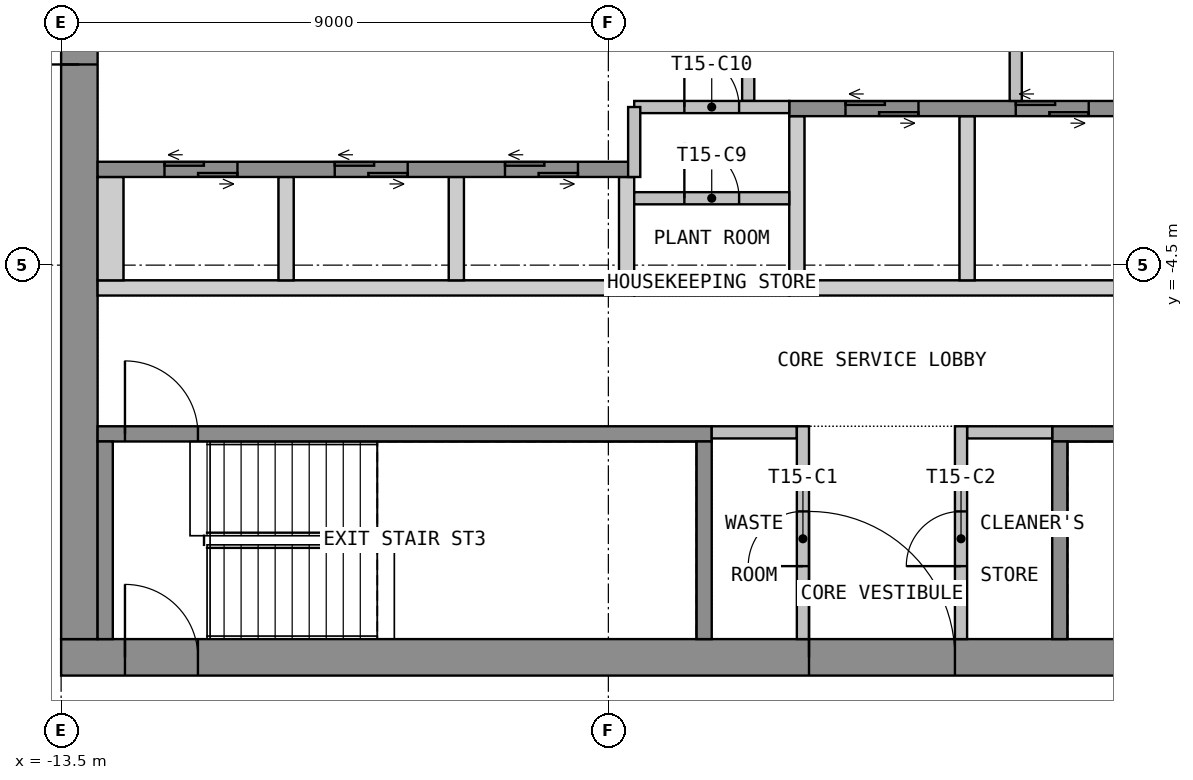
"""IFC4 building model, lengths in metres.
Left out: names, types, materials, properties, quantities, classifications, styles, units other than length and angle.
Written with IfcOpenShell. Run it as: python <this file> out.ifc"""

import sys

from ifc_helpers import new_model, si_unit, direction, frame, frame_2d, origin, place, context, subcontext, project, spatial, polyline, rectangle, outline, extrude, element, fill, save


model = new_model("IFC4")
c1 = context("Model", 3, precision=1e-05, world=origin(), true_north=direction((0.0, 1.0)))
c2 = subcontext(c1, "Body", "Model", "MODEL_VIEW")
j1 = project(units=[si_unit("LENGTHUNIT", "METRE"), si_unit("PLANEANGLEUNIT", "RADIAN")], contexts=[c1])
p1 = place(None, origin())
s1 = spatial("IfcSite", under=j1, at=p1, CompositionType="ELEMENT")
p2 = place(p1, origin())
s2 = spatial("IfcBuilding", under=s1, at=p2, CompositionType="ELEMENT")
p3 = place(p2, frame((0.0, 0.0, 207.3)))
s3 = spatial("IfcBuildingStorey", under=s2, at=p3, CompositionType="ELEMENT", Elevation=207.3)
p4 = place(p3, frame((-13.5, -10.95, 0.0), z_axis=(0.0, 0.0, 1.0), x_axis=(1.0, 0.0, 0.0)))
e1 = element("IfcWall", 1, at=p4, inside=s3, PredefinedType="SHEAR", context=c2, shape_type="SweptSolid", body=[
    extrude(rectangle(XDim=27.0, YDim=0.6, at=frame_2d((13.5, 0.0))), origin(), (0.0, 0.0, 1.0), 3.55),
])
p5 = place(p4, frame((12.3, 0.0, 0.0)))
e2 = element("IfcOpeningElement", 2, at=p5, cuts=e1, PredefinedType="OPENING", context=c2, shape_type="SweptSolid", body=[
    extrude(rectangle(XDim=2.4, YDim=2.1, at=frame_2d((1.2, 1.05))), frame((0.0, 0.31, 0.0), z_axis=(0.0, -1.0, 0.0), x_axis=(1.0, 0.0, 0.0)), (0.0, 0.0, 1.0), 0.62),
])
p6 = place(p4, frame((1.05, 0.0, 0.0)))
e3 = element("IfcOpeningElement", 3, at=p6, cuts=e1, PredefinedType="OPENING", context=c2, shape_type="SweptSolid", body=[
    extrude(rectangle(XDim=1.2, YDim=2.1, at=frame_2d((0.6, 1.05))), frame((0.0, 0.31, 0.0), z_axis=(0.0, -1.0, 0.0), x_axis=(1.0, 0.0, 0.0)), (0.0, 0.0, 1.0), 0.62),
])
p7 = place(p4, frame((24.75, 0.0, 0.0)))
e4 = element("IfcOpeningElement", 4, at=p7, cuts=e1, PredefinedType="OPENING", context=c2, shape_type="SweptSolid", body=[
    extrude(rectangle(XDim=1.2, YDim=2.1, at=frame_2d((0.6, 1.05))), frame((0.0, 0.31, 0.0), z_axis=(0.0, -1.0, 0.0), x_axis=(1.0, 0.0, 0.0)), (0.0, 0.0, 1.0), 0.62),
])
p8 = place(p3, frame((-13.2, -10.65, 0.0), z_axis=(0.0, 0.0, 1.0), x_axis=(0.0, 1.0, 0.0)))
e5 = element("IfcWall", 5, at=p8, inside=s3, PredefinedType="SHEAR", context=c2, shape_type="SweptSolid", body=[
    extrude(rectangle(XDim=21.3, YDim=0.6, at=frame_2d((10.65, 0.0))), origin(), (0.0, 0.0, 1.0), 3.55),
])
p9 = place(p8, frame((9.45, 0.0, 0.0)))
e6 = element("IfcOpeningElement", 6, at=p9, cuts=e5, PredefinedType="OPENING", context=c2, shape_type="SweptSolid", body=[
    extrude(rectangle(XDim=2.4, YDim=2.1, at=frame_2d((1.2, 1.05))), frame((0.0, 0.31, 0.0), z_axis=(0.0, -1.0, 0.0), x_axis=(1.0, 0.0, 0.0)), (0.0, 0.0, 1.0), 0.62),
])
p10 = place(p3, origin())
e7 = element("IfcWall", 7, at=p10, inside=s3, PredefinedType="SHEAR", context=c2, shape_type="SweptSolid", body=[
    extrude(outline(polyline([(-12.9, -5.0), (-4.075, -5.0), (-4.075, -4.75), (-12.9, -4.75), (-12.9, -5.0)])), origin(), (0.0, 0.0, 1.0), 3.55),
])
p11 = place(p3, origin())
e8 = element("IfcWall", 8, at=p11, inside=s3, PredefinedType="SHEAR", context=c2, shape_type="SweptSolid", body=[
    extrude(outline(polyline([(-1.525, -5.0), (12.9, -5.0), (12.9, -4.75), (-1.525, -4.75), (-1.525, -5.0)])), origin(), (0.0, 0.0, 1.0), 3.55),
])
p12 = place(p3, origin())
e9 = element("IfcWall", 9, at=p12, inside=s3, PredefinedType="SHEAR", context=c2, shape_type="SweptSolid", body=[
    extrude(outline(polyline([(-12.9, -4.75), (-12.475, -4.75), (-12.475, -3.05), (-12.9, -3.05), (-12.9, -4.75)])), origin(), (0.0, 0.0, 1.0), 3.55),
])
p13 = place(p3, origin())
e10 = element("IfcWall", 10, at=p13, inside=s3, PredefinedType="SHEAR", context=c2, shape_type="SweptSolid", body=[
    extrude(outline(polyline([(-9.925, -4.75), (-9.675, -4.75), (-9.675, -3.05), (-9.925, -3.05), (-9.925, -4.75)])), origin(), (0.0, 0.0, 1.0), 3.55),
])
p14 = place(p3, origin())
e11 = element("IfcWall", 11, at=p14, inside=s3, PredefinedType="SHEAR", context=c2, shape_type="SweptSolid", body=[
    extrude(outline(polyline([(-7.125, -4.75), (-6.875, -4.75), (-6.875, -3.05), (-7.125, -3.05), (-7.125, -4.75)])), origin(), (0.0, 0.0, 1.0), 3.55),
])
p15 = place(p3, origin())
e12 = element("IfcWall", 12, at=p15, inside=s3, PredefinedType="SHEAR", context=c2, shape_type="SweptSolid", body=[
    extrude(outline(polyline([(-4.325, -4.75), (-4.075, -4.75), (-4.075, -3.05), (-4.325, -3.05), (-4.325, -4.75)])), origin(), (0.0, 0.0, 1.0), 3.55),
])
p16 = place(p3, origin())
e13 = element("IfcWall", 13, at=p16, inside=s3, PredefinedType="SHEAR", context=c2, shape_type="SweptSolid", body=[
    extrude(outline(polyline([(-1.525, -4.75), (-1.275, -4.75), (-1.275, -2.05), (-1.525, -2.05), (-1.525, -4.75)])), origin(), (0.0, 0.0, 1.0), 3.55),
])
p17 = place(p3, origin())
e14 = element("IfcWall", 14, at=p17, inside=s3, PredefinedType="SHEAR", context=c2, shape_type="SweptSolid", body=[
    extrude(outline(polyline([(1.275, -4.75), (1.525, -4.75), (1.525, -2.05), (1.275, -2.05), (1.275, -4.75)])), origin(), (0.0, 0.0, 1.0), 3.55),
])
p18 = place(p3, frame((-12.9, -2.925, 0.0), z_axis=(0.0, 0.0, 1.0), x_axis=(1.0, 0.0, 0.0)))
e15 = element("IfcWall", 15, at=p18, inside=s3, PredefinedType="SHEAR", context=c2, shape_type="SweptSolid", body=[
    extrude(rectangle(XDim=8.825, YDim=0.25, at=frame_2d((4.413, 0.0))), origin(), (0.0, 0.0, 1.0), 3.55),
])
p19 = place(p18, frame((1.1, 0.0, 0.0)))
e16 = element("IfcOpeningElement", 16, at=p19, cuts=e15, PredefinedType="OPENING", context=c2, shape_type="SweptSolid", body=[
    extrude(rectangle(XDim=1.2, YDim=2.1, at=frame_2d((0.6, 1.05))), frame((0.0, 0.135, 0.0), z_axis=(0.0, -1.0, 0.0), x_axis=(1.0, 0.0, 0.0)), (0.0, 0.0, 1.0), 0.27),
])
p20 = place(p18, frame((3.9, 0.0, 0.0)))
e17 = element("IfcOpeningElement", 17, at=p20, cuts=e15, PredefinedType="OPENING", context=c2, shape_type="SweptSolid", body=[
    extrude(rectangle(XDim=1.2, YDim=2.1, at=frame_2d((0.6, 1.05))), frame((0.0, 0.135, 0.0), z_axis=(0.0, -1.0, 0.0), x_axis=(1.0, 0.0, 0.0)), (0.0, 0.0, 1.0), 0.27),
])
p21 = place(p18, frame((6.7, 0.0, 0.0)))
e18 = element("IfcOpeningElement", 18, at=p21, cuts=e15, PredefinedType="OPENING", context=c2, shape_type="SweptSolid", body=[
    extrude(rectangle(XDim=1.2, YDim=2.1, at=frame_2d((0.6, 1.05))), frame((0.0, 0.135, 0.0), z_axis=(0.0, -1.0, 0.0), x_axis=(1.0, 0.0, 0.0)), (0.0, 0.0, 1.0), 0.27),
])
p22 = place(p3, frame((-1.525, -1.925, 0.0), z_axis=(0.0, 0.0, 1.0), x_axis=(1.0, 0.0, 0.0)))
e19 = element("IfcWall", 19, at=p22, inside=s3, PredefinedType="SHEAR", context=c2, shape_type="SweptSolid", body=[
    extrude(rectangle(XDim=14.425, YDim=0.25, at=frame_2d((7.212, 0.0))), origin(), (0.0, 0.0, 1.0), 3.55),
])
p23 = place(p22, frame((0.925, 0.0, 0.0)))
e20 = element("IfcOpeningElement", 20, at=p23, cuts=e19, PredefinedType="OPENING", context=c2, shape_type="SweptSolid", body=[
    extrude(rectangle(XDim=1.2, YDim=2.1, at=frame_2d((0.6, 1.05))), frame((0.0, 0.135, 0.0), z_axis=(0.0, -1.0, 0.0), x_axis=(1.0, 0.0, 0.0)), (0.0, 0.0, 1.0), 0.27),
])
p24 = place(p22, frame((3.725, 0.0, 0.0)))
e21 = element("IfcOpeningElement", 21, at=p24, cuts=e19, PredefinedType="OPENING", context=c2, shape_type="SweptSolid", body=[
    extrude(rectangle(XDim=1.2, YDim=2.1, at=frame_2d((0.6, 1.05))), frame((0.0, 0.135, 0.0), z_axis=(0.0, -1.0, 0.0), x_axis=(1.0, 0.0, 0.0)), (0.0, 0.0, 1.0), 0.27),
])
p25 = place(p3, frame((-2.2, -1.8, 0.0), z_axis=(0.0, 0.0, 1.0), x_axis=(0.0, 1.0, 0.0)))
e22 = element("IfcWall", 22, at=p25, inside=s3, PredefinedType="PARTITIONING", context=c2, shape_type="SweptSolid", body=[
    extrude(rectangle(XDim=3.6, YDim=0.2, at=frame_2d((1.8, 0.0))), origin(), (0.0, 0.0, 1.0), 3.55),
])
p26 = place(p25, frame((1.2, 0.0, 0.0)))
e23 = element("IfcOpeningElement", 23, at=p26, cuts=e22, PredefinedType="OPENING", context=c2, shape_type="SweptSolid", body=[
    extrude(rectangle(XDim=1.2, YDim=2.1, at=frame_2d((0.6, 1.05))), frame((0.0, 0.11, 0.0), z_axis=(0.0, -1.0, 0.0), x_axis=(1.0, 0.0, 0.0)), (0.0, 0.0, 1.0), 0.22),
])
p27 = place(p3, frame((2.2, -1.8, 0.0), z_axis=(0.0, 0.0, 1.0), x_axis=(0.0, 1.0, 0.0)))
e24 = element("IfcWall", 24, at=p27, inside=s3, PredefinedType="PARTITIONING", context=c2, shape_type="SweptSolid", body=[
    extrude(rectangle(XDim=3.6, YDim=0.2, at=frame_2d((1.8, 0.0))), origin(), (0.0, 0.0, 1.0), 3.55),
])
p28 = place(p27, frame((1.2, 0.0, 0.0)))
e25 = element("IfcOpeningElement", 25, at=p28, cuts=e24, PredefinedType="OPENING", context=c2, shape_type="SweptSolid", body=[
    extrude(rectangle(XDim=1.2, YDim=2.1, at=frame_2d((0.6, 1.05))), frame((0.0, 0.11, 0.0), z_axis=(0.0, -1.0, 0.0), x_axis=(1.0, 0.0, 0.0)), (0.0, 0.0, 1.0), 0.22),
])
p29 = place(p3, frame((-12.9, -7.275, 0.0), z_axis=(0.0, 0.0, 1.0), x_axis=(1.0, 0.0, 0.0)))
e26 = element("IfcWall", 26, at=p29, inside=s3, PredefinedType="SHEAR", context=c2, shape_type="SweptSolid", body=[
    extrude(rectangle(XDim=10.1, YDim=0.25, at=frame_2d((5.05, 0.0))), origin(), (0.0, 0.0, 1.0), 3.55),
])
p30 = place(p29, frame((0.45, 0.0, 0.0)))
e27 = element("IfcOpeningElement", 27, at=p30, cuts=e26, PredefinedType="OPENING", context=c2, shape_type="SweptSolid", body=[
    extrude(rectangle(XDim=1.2, YDim=2.1, at=frame_2d((0.6, 1.05))), frame((0.0, 0.135, 0.0), z_axis=(0.0, -1.0, 0.0), x_axis=(1.0, 0.0, 0.0)), (0.0, 0.0, 1.0), 0.27),
])
for number, where, z_axis, x_axis in (
    (28, (-12.775, -10.65, 0.0), (0.0, 0.0, 1.0), (0.0, 1.0, 0.0)),
    (29, (-2.925, -10.65, 0.0), (0.0, 0.0, 1.0), (0.0, 1.0, 0.0)),
):
    element("IfcWall", number, at=place(p3, frame(where, z_axis=z_axis, x_axis=x_axis)), inside=s3, PredefinedType="SHEAR", context=c2, shape_type="SweptSolid", body=[
        extrude(rectangle(XDim=3.25, YDim=0.25, at=frame_2d((1.625, 0.0))), origin(), (0.0, 0.0, 1.0), 3.55),
    ])
p31 = place(p3, frame((2.8, -7.275, 0.0), z_axis=(0.0, 0.0, 1.0), x_axis=(1.0, 0.0, 0.0)))
e30 = element("IfcWall", 30, at=p31, inside=s3, PredefinedType="SHEAR", context=c2, shape_type="SweptSolid", body=[
    extrude(rectangle(XDim=10.1, YDim=0.25, at=frame_2d((5.05, 0.0))), origin(), (0.0, 0.0, 1.0), 3.55),
])
p32 = place(p31, frame((8.45, 0.0, 0.0)))
e31 = element("IfcOpeningElement", 31, at=p32, cuts=e30, PredefinedType="OPENING", context=c2, shape_type="SweptSolid", body=[
    extrude(rectangle(XDim=1.2, YDim=2.1, at=frame_2d((0.6, 1.05))), frame((0.0, 0.135, 0.0), z_axis=(0.0, -1.0, 0.0), x_axis=(1.0, 0.0, 0.0)), (0.0, 0.0, 1.0), 0.27),
])
p33 = place(p3, frame((2.925, -10.65, 0.0), z_axis=(0.0, 0.0, 1.0), x_axis=(0.0, 1.0, 0.0)))
e32 = element("IfcWall", 32, at=p33, inside=s3, PredefinedType="SHEAR", context=c2, shape_type="SweptSolid", body=[
    extrude(rectangle(XDim=3.25, YDim=0.25, at=frame_2d((1.625, 0.0))), origin(), (0.0, 0.0, 1.0), 3.55),
])
for number, where, z_axis, x_axis in (
    (33, (-2.8, -7.25, 0.0), (0.0, 0.0, 1.0), (1.0, 0.0, 0.0)),
    (34, (1.4, -7.25, 0.0), (0.0, 0.0, 1.0), (1.0, 0.0, 0.0)),
):
    element("IfcWall", number, at=place(p3, frame(where, z_axis=z_axis, x_axis=x_axis)), inside=s3, PredefinedType="PARTITIONING", context=c2, shape_type="SweptSolid", body=[
        extrude(rectangle(XDim=1.4, YDim=0.2, at=frame_2d((0.7, 0.0))), origin(), (0.0, 0.0, 1.0), 3.55),
    ])
p34 = place(p3, frame((-1.3, -10.65, 0.0), z_axis=(0.0, 0.0, 1.0), x_axis=(0.0, 1.0, 0.0)))
e35 = element("IfcWall", 35, at=p34, inside=s3, PredefinedType="PARTITIONING", context=c2, shape_type="SweptSolid", body=[
    extrude(rectangle(XDim=3.5, YDim=0.2, at=frame_2d((1.75, 0.0))), origin(), (0.0, 0.0, 1.0), 3.55),
])
p35 = place(p34, frame((1.2, 0.0, 0.0)))
e36 = element("IfcOpeningElement", 36, at=p35, cuts=e35, PredefinedType="OPENING", context=c2, shape_type="SweptSolid", body=[
    extrude(rectangle(XDim=0.9, YDim=2.1, at=frame_2d((0.45, 1.05))), frame((0.0, 0.11, 0.0), z_axis=(0.0, -1.0, 0.0), x_axis=(1.0, 0.0, 0.0)), (0.0, 0.0, 1.0), 0.22),
])
p36 = place(p3, frame((1.3, -10.65, 0.0), z_axis=(0.0, 0.0, 1.0), x_axis=(0.0, 1.0, 0.0)))
e37 = element("IfcWall", 37, at=p36, inside=s3, PredefinedType="PARTITIONING", context=c2, shape_type="SweptSolid", body=[
    extrude(rectangle(XDim=3.5, YDim=0.2, at=frame_2d((1.75, 0.0))), origin(), (0.0, 0.0, 1.0), 3.55),
])
p37 = place(p36, frame((1.2, 0.0, 0.0)))
e38 = element("IfcOpeningElement", 38, at=p37, cuts=e37, PredefinedType="OPENING", context=c2, shape_type="SweptSolid", body=[
    extrude(rectangle(XDim=0.9, YDim=2.1, at=frame_2d((0.45, 1.05))), frame((0.0, 0.11, 0.0), z_axis=(0.0, -1.0, 0.0), x_axis=(1.0, 0.0, 0.0)), (0.0, 0.0, 1.0), 0.22),
])
p38 = place(p3, frame((-4.075, -3.4, 0.0), z_axis=(0.0, 0.0, 1.0), x_axis=(1.0, 0.0, 0.0)))
e39 = element("IfcWall", 39, at=p38, inside=s3, PredefinedType="PARTITIONING", context=c2, shape_type="SweptSolid", body=[
    extrude(rectangle(XDim=2.55, YDim=0.2, at=frame_2d((1.275, 0.0))), origin(), (0.0, 0.0, 1.0), 3.55),
])
p39 = place(p38, frame((0.825, 0.0, 0.0)))
e40 = element("IfcOpeningElement", 40, at=p39, cuts=e39, PredefinedType="OPENING", context=c2, shape_type="SweptSolid", body=[
    extrude(rectangle(XDim=0.9, YDim=2.1, at=frame_2d((0.45, 1.05))), frame((0.0, 0.11, 0.0), z_axis=(0.0, -1.0, 0.0), x_axis=(1.0, 0.0, 0.0)), (0.0, 0.0, 1.0), 0.22),
])
p40 = place(p3, frame((-4.075, -1.9, 0.0), z_axis=(0.0, 0.0, 1.0), x_axis=(1.0, 0.0, 0.0)))
e41 = element("IfcWall", 41, at=p40, inside=s3, PredefinedType="PARTITIONING", context=c2, shape_type="SweptSolid", body=[
    extrude(rectangle(XDim=2.55, YDim=0.2, at=frame_2d((1.275, 0.0))), origin(), (0.0, 0.0, 1.0), 3.55),
])
p41 = place(p40, frame((0.825, 0.0, 0.0)))
e42 = element("IfcOpeningElement", 42, at=p41, cuts=e41, PredefinedType="OPENING", context=c2, shape_type="SweptSolid", body=[
    extrude(rectangle(XDim=0.9, YDim=2.1, at=frame_2d((0.45, 1.05))), frame((0.0, 0.11, 0.0), z_axis=(0.0, -1.0, 0.0), x_axis=(1.0, 0.0, 0.0)), (0.0, 0.0, 1.0), 0.22),
])
p42 = place(p3, frame((-4.075, -4.9, 0.0), z_axis=(0.0, 0.0, 1.0), x_axis=(1.0, 0.0, 0.0)))
e43 = element("IfcWall", 43, at=p42, inside=s3, PredefinedType="PARTITIONING", context=c2, shape_type="SweptSolid", body=[
    extrude(rectangle(XDim=2.55, YDim=0.2, at=frame_2d((1.275, 0.0))), origin(), (0.0, 0.0, 1.0), 3.55),
])
p43 = place(p3, frame((-4.075, -1.9, 0.0), z_axis=(0.0, 0.0, 1.0), x_axis=(0.0, -1.0, 0.0)))
e44 = element("IfcWall", 44, at=p43, inside=s3, PredefinedType="PARTITIONING", context=c2, shape_type="SweptSolid", body=[
    extrude(rectangle(XDim=1.15, YDim=0.2, at=frame_2d((0.575, 0.0))), origin(), (0.0, 0.0, 1.0), 3.55),
])
p44 = place(p9, origin())
e45 = element("IfcDoor", 45, at=p44, inside=s3, OperationType="DOUBLE_DOOR_DOUBLE_SWING", PredefinedType="DOOR", context=c2, shape_type="SweptSolid", body=[
    extrude(rectangle(XDim=2.4, YDim=2.1, at=frame_2d((1.2, 1.05))), frame((0.0, 0.025, 0.0), z_axis=(0.0, -1.0, 0.0), x_axis=(1.0, 0.0, 0.0)), (0.0, 0.0, 1.0), 0.05),
])
fill(e6, e45)
p45 = place(p5, origin())
e46 = element("IfcDoor", 46, at=p45, inside=s3, OperationType="DOUBLE_DOOR_DOUBLE_SWING", PredefinedType="DOOR", context=c2, shape_type="SweptSolid", body=[
    extrude(rectangle(XDim=2.4, YDim=2.1, at=frame_2d((1.2, 1.05))), frame((0.0, 0.025, 0.0), z_axis=(0.0, -1.0, 0.0), x_axis=(1.0, 0.0, 0.0)), (0.0, 0.0, 1.0), 0.05),
])
fill(e2, e46)
p46 = place(p6, origin())
e47 = element("IfcDoor", 47, at=p46, inside=s3, OperationType="SINGLE_SWING_RIGHT", PredefinedType="DOOR", context=c2, shape_type="SweptSolid", body=[
    extrude(rectangle(XDim=1.2, YDim=2.1, at=frame_2d((0.6, 1.05))), frame((0.0, 0.025, 0.0), z_axis=(0.0, -1.0, 0.0), x_axis=(1.0, 0.0, 0.0)), (0.0, 0.0, 1.0), 0.05),
])
fill(e3, e47)
p47 = place(p19, origin())
e48 = element("IfcDoor", 48, at=p47, inside=s3, OperationType="DOUBLE_DOOR_SLIDING", PredefinedType="DOOR", context=c2, shape_type="SweptSolid", body=[
    extrude(rectangle(XDim=1.2, YDim=2.1, at=frame_2d((0.6, 1.05))), frame((0.0, 0.025, 0.0), z_axis=(0.0, -1.0, 0.0), x_axis=(1.0, 0.0, 0.0)), (0.0, 0.0, 1.0), 0.05),
])
fill(e16, e48)
p48 = place(p20, origin())
e49 = element("IfcDoor", 49, at=p48, inside=s3, OperationType="DOUBLE_DOOR_SLIDING", PredefinedType="DOOR", context=c2, shape_type="SweptSolid", body=[
    extrude(rectangle(XDim=1.2, YDim=2.1, at=frame_2d((0.6, 1.05))), frame((0.0, 0.025, 0.0), z_axis=(0.0, -1.0, 0.0), x_axis=(1.0, 0.0, 0.0)), (0.0, 0.0, 1.0), 0.05),
])
fill(e17, e49)
p49 = place(p21, origin())
e50 = element("IfcDoor", 50, at=p49, inside=s3, OperationType="DOUBLE_DOOR_SLIDING", PredefinedType="DOOR", context=c2, shape_type="SweptSolid", body=[
    extrude(rectangle(XDim=1.2, YDim=2.1, at=frame_2d((0.6, 1.05))), frame((0.0, 0.025, 0.0), z_axis=(0.0, -1.0, 0.0), x_axis=(1.0, 0.0, 0.0)), (0.0, 0.0, 1.0), 0.05),
])
fill(e18, e50)
p50 = place(p23, origin())
e51 = element("IfcDoor", 51, at=p50, inside=s3, OperationType="DOUBLE_DOOR_SLIDING", PredefinedType="DOOR", context=c2, shape_type="SweptSolid", body=[
    extrude(rectangle(XDim=1.2, YDim=2.1, at=frame_2d((0.6, 1.05))), frame((0.0, 0.025, 0.0), z_axis=(0.0, -1.0, 0.0), x_axis=(1.0, 0.0, 0.0)), (0.0, 0.0, 1.0), 0.05),
])
fill(e20, e51)
p51 = place(p24, origin())
e52 = element("IfcDoor", 52, at=p51, inside=s3, OperationType="DOUBLE_DOOR_SLIDING", PredefinedType="DOOR", context=c2, shape_type="SweptSolid", body=[
    extrude(rectangle(XDim=1.2, YDim=2.1, at=frame_2d((0.6, 1.05))), frame((0.0, 0.025, 0.0), z_axis=(0.0, -1.0, 0.0), x_axis=(1.0, 0.0, 0.0)), (0.0, 0.0, 1.0), 0.05),
])
fill(e21, e52)
p52 = place(p30, origin())
e53 = element("IfcDoor", 53, at=p52, inside=s3, OperationType="SINGLE_SWING_LEFT", PredefinedType="DOOR", context=c2, shape_type="SweptSolid", body=[
    extrude(rectangle(XDim=1.2, YDim=2.1, at=frame_2d((0.6, 1.05))), frame((0.0, 0.025, 0.0), z_axis=(0.0, -1.0, 0.0), x_axis=(1.0, 0.0, 0.0)), (0.0, 0.0, 1.0), 0.05),
])
fill(e27, e53)
p53 = place(p35, origin())
e54 = element("IfcDoor", 54, at=p53, inside=s3, OperationType="SINGLE_SWING_LEFT", PredefinedType="DOOR", context=c2, shape_type="SweptSolid", body=[
    extrude(rectangle(XDim=0.9, YDim=2.1, at=frame_2d((0.45, 1.05))), frame((0.0, 0.025, 0.0), z_axis=(0.0, -1.0, 0.0), x_axis=(1.0, 0.0, 0.0)), (0.0, 0.0, 1.0), 0.05),
])
fill(e36, e54)
p54 = place(p37, origin())
e55 = element("IfcDoor", 55, at=p54, inside=s3, OperationType="SINGLE_SWING_LEFT", PredefinedType="DOOR", context=c2, shape_type="SweptSolid", body=[
    extrude(rectangle(XDim=0.9, YDim=2.1, at=frame_2d((0.45, 1.05))), frame((0.0, 0.025, 0.0), z_axis=(0.0, -1.0, 0.0), x_axis=(1.0, 0.0, 0.0)), (0.0, 0.0, 1.0), 0.05),
])
fill(e38, e55)
p55 = place(p39, origin())
e56 = element("IfcDoor", 56, at=p55, inside=s3, OperationType="SINGLE_SWING_LEFT", PredefinedType="DOOR", context=c2, shape_type="SweptSolid", body=[
    extrude(rectangle(XDim=0.9, YDim=2.1, at=frame_2d((0.45, 1.05))), frame((0.0, 0.025, 0.0), z_axis=(0.0, -1.0, 0.0), x_axis=(1.0, 0.0, 0.0)), (0.0, 0.0, 1.0), 0.05),
])
fill(e40, e56)
p56 = place(p41, origin())
e57 = element("IfcDoor", 57, at=p56, inside=s3, OperationType="SINGLE_SWING_LEFT", PredefinedType="DOOR", context=c2, shape_type="SweptSolid", body=[
    extrude(rectangle(XDim=0.9, YDim=2.1, at=frame_2d((0.45, 1.05))), frame((0.0, 0.025, 0.0), z_axis=(0.0, -1.0, 0.0), x_axis=(1.0, 0.0, 0.0)), (0.0, 0.0, 1.0), 0.05),
])
fill(e42, e57)
save(model, sys.argv[1])
